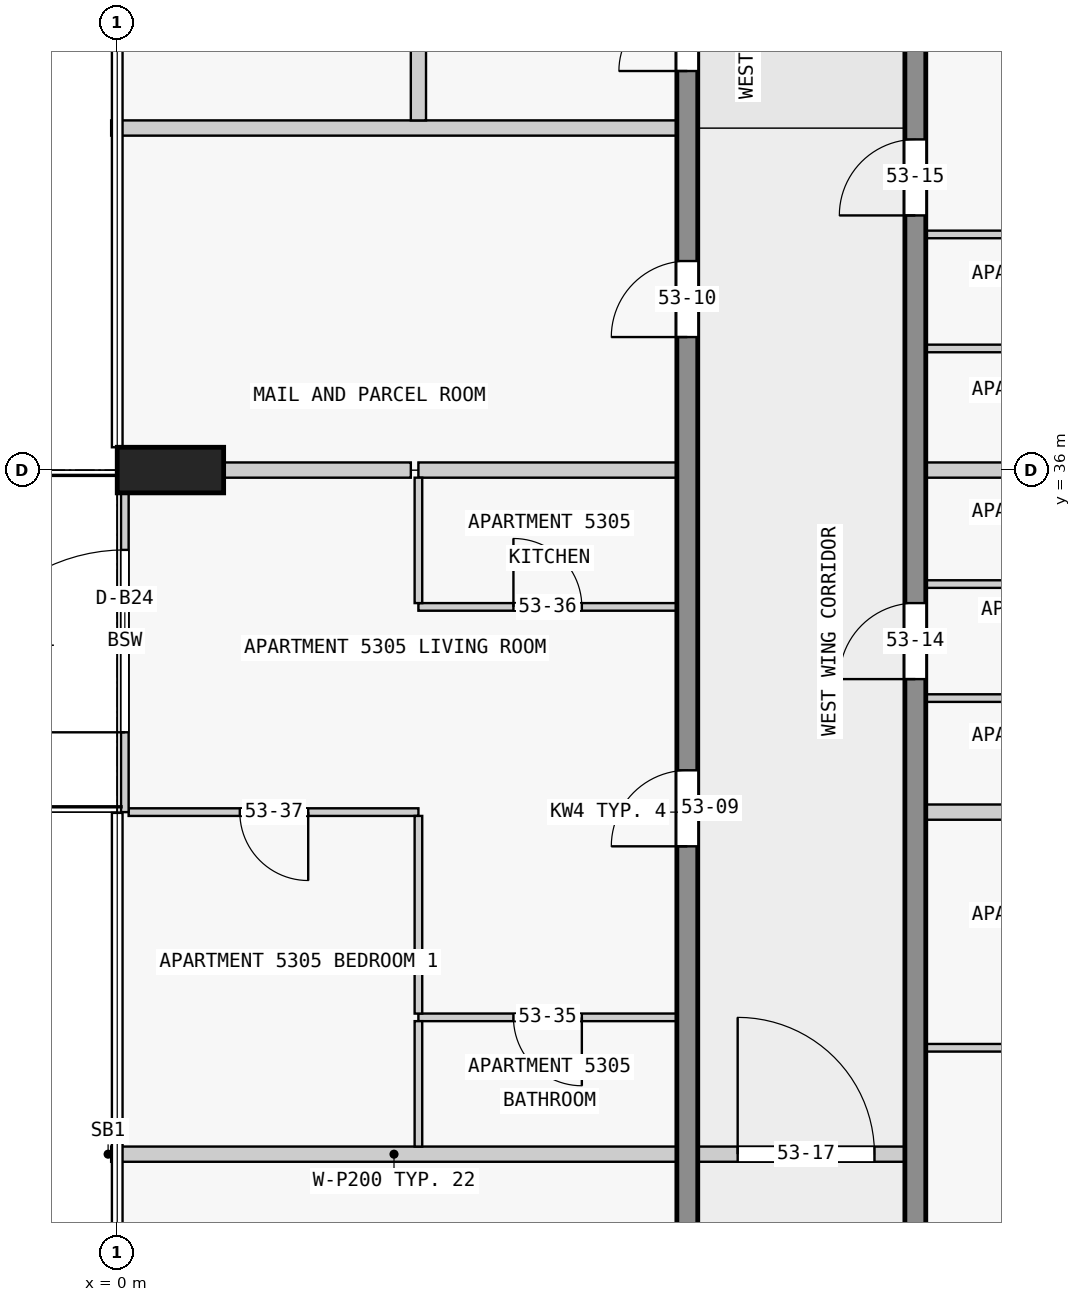
"""IFC4 building model, lengths in metres.
Left out: names, types, materials, properties, quantities, classifications, styles, units other than length and angle.
Written with IfcOpenShell. Run it as: python <this file> out.ifc"""

import sys

from ifc_helpers import new_model, si_unit, direction, frame, frame_2d, origin, origin_2d, place, context, subcontext, project, spatial, rectangle, extrude, element, fill, save


model = new_model("IFC4")
c1 = context("Model", 3, precision=1e-05, world=origin(), true_north=direction((0.0, 1.0)))
c2 = subcontext(c1, "Body", "Model", "MODEL_VIEW")
j1 = project(units=[si_unit("LENGTHUNIT", "METRE"), si_unit("PLANEANGLEUNIT", "RADIAN")], contexts=[c1])
p1 = place(None, origin())
s1 = spatial("IfcSite", under=j1, at=p1, CompositionType="ELEMENT")
p2 = place(p1, origin())
s2 = spatial("IfcBuilding", under=s1, at=p2, CompositionType="ELEMENT")
p3 = place(p2, frame((0.0, 0.0, 204.9)))
s3 = spatial("IfcBuildingStorey", under=s2, at=p3, CompositionType="ELEMENT", Elevation=204.9)
p4 = place(p3, frame((0.7, 36.0, 0.0), z_axis=(0.0, 0.0, 1.0), x_axis=(0.0, 1.0, 0.0)))
e1 = element("IfcColumn", 1, at=p4, inside=s3, PredefinedType="COLUMN", context=c2, shape_type="SweptSolid", body=[
    extrude(rectangle(XDim=0.6, YDim=1.4, at=origin_2d()), origin(), (0.0, 0.0, 1.0), 3.5),
])
p5 = place(p3, frame((7.5, 18.0, 0.0), z_axis=(0.0, 0.0, 1.0), x_axis=(0.0, 1.0, 0.0)))
e2 = element("IfcWall", 2, at=p5, inside=s3, PredefinedType="SHEAR", context=c2, shape_type="SweptSolid", body=[
    extrude(rectangle(XDim=27.0, YDim=0.275, at=frame_2d((13.5, 0.0))), origin(), (0.0, 0.0, 1.0), 3.25),
])
p6 = place(p5, frame((1.75, 0.0, 0.0)))
e3 = element("IfcOpeningElement", 3, at=p6, cuts=e2, PredefinedType="OPENING", context=c2, shape_type="SweptSolid", body=[
    extrude(rectangle(XDim=1.0, YDim=2.1, at=frame_2d((0.5, 1.05))), frame((0.0, 0.147, 0.0), z_axis=(0.0, -1.0, 0.0), x_axis=(1.0, 0.0, 0.0)), (0.0, 0.0, 1.0), 0.295),
])
p7 = place(p5, frame((5.85, 0.0, 0.0)))
e4 = element("IfcOpeningElement", 4, at=p7, cuts=e2, PredefinedType="OPENING", context=c2, shape_type="SweptSolid", body=[
    extrude(rectangle(XDim=1.8, YDim=2.1, at=frame_2d((0.9, 1.05))), frame((0.0, 0.147, 0.0), z_axis=(0.0, -1.0, 0.0), x_axis=(1.0, 0.0, 0.0)), (0.0, 0.0, 1.0), 0.295),
])
p8 = place(p5, frame((13.05, 0.0, 0.0)))
e5 = element("IfcOpeningElement", 5, at=p8, cuts=e2, PredefinedType="OPENING", context=c2, shape_type="SweptSolid", body=[
    extrude(rectangle(XDim=1.0, YDim=2.1, at=frame_2d((0.5, 1.05))), frame((0.0, 0.147, 0.0), z_axis=(0.0, -1.0, 0.0), x_axis=(1.0, 0.0, 0.0)), (0.0, 0.0, 1.0), 0.295),
])
p9 = place(p5, frame((19.75, 0.0, 0.0)))
e6 = element("IfcOpeningElement", 6, at=p9, cuts=e2, PredefinedType="OPENING", context=c2, shape_type="SweptSolid", body=[
    extrude(rectangle(XDim=1.0, YDim=2.1, at=frame_2d((0.5, 1.05))), frame((0.0, 0.147, 0.0), z_axis=(0.0, -1.0, 0.0), x_axis=(1.0, 0.0, 0.0)), (0.0, 0.0, 1.0), 0.295),
])
p10 = place(p5, frame((23.25, 0.0, 0.0)))
e7 = element("IfcOpeningElement", 7, at=p10, cuts=e2, PredefinedType="OPENING", context=c2, shape_type="SweptSolid", body=[
    extrude(rectangle(XDim=0.9, YDim=2.1, at=frame_2d((0.45, 1.05))), frame((0.0, 0.147, 0.0), z_axis=(0.0, -1.0, 0.0), x_axis=(1.0, 0.0, 0.0)), (0.0, 0.0, 1.0), 0.295),
])
p11 = place(p5, frame((25.45, 0.0, 0.0)))
e8 = element("IfcOpeningElement", 8, at=p11, cuts=e2, PredefinedType="OPENING", context=c2, shape_type="SweptSolid", body=[
    extrude(rectangle(XDim=1.0, YDim=2.1, at=frame_2d((0.5, 1.05))), frame((0.0, 0.147, 0.0), z_axis=(0.0, -1.0, 0.0), x_axis=(1.0, 0.0, 0.0)), (0.0, 0.0, 1.0), 0.295),
])
p12 = place(p3, frame((10.5, 18.0, 0.0), z_axis=(0.0, 0.0, 1.0), x_axis=(0.0, 1.0, 0.0)))
e9 = element("IfcWall", 9, at=p12, inside=s3, PredefinedType="SHEAR", context=c2, shape_type="SweptSolid", body=[
    extrude(rectangle(XDim=27.0, YDim=0.275, at=frame_2d((13.5, 0.0))), origin(), (0.0, 0.0, 1.0), 3.25),
])
p13 = place(p12, frame((4.85, 0.0, 0.0)))
e10 = element("IfcOpeningElement", 10, at=p13, cuts=e9, PredefinedType="OPENING", context=c2, shape_type="SweptSolid", body=[
    extrude(rectangle(XDim=1.0, YDim=2.1, at=frame_2d((0.5, 1.05))), frame((0.0, 0.147, 0.0), z_axis=(0.0, -1.0, 0.0), x_axis=(1.0, 0.0, 0.0)), (0.0, 0.0, 1.0), 0.295),
])
p14 = place(p12, frame((15.25, 0.0, 0.0)))
e11 = element("IfcOpeningElement", 11, at=p14, cuts=e9, PredefinedType="OPENING", context=c2, shape_type="SweptSolid", body=[
    extrude(rectangle(XDim=1.0, YDim=2.1, at=frame_2d((0.5, 1.05))), frame((0.0, 0.147, 0.0), z_axis=(0.0, -1.0, 0.0), x_axis=(1.0, 0.0, 0.0)), (0.0, 0.0, 1.0), 0.295),
])
p15 = place(p12, frame((21.35, 0.0, 0.0)))
e12 = element("IfcOpeningElement", 12, at=p15, cuts=e9, PredefinedType="OPENING", context=c2, shape_type="SweptSolid", body=[
    extrude(rectangle(XDim=1.0, YDim=2.1, at=frame_2d((0.5, 1.05))), frame((0.0, 0.147, 0.0), z_axis=(0.0, -1.0, 0.0), x_axis=(1.0, 0.0, 0.0)), (0.0, 0.0, 1.0), 0.295),
])
p16 = place(p3, frame((0.1, 31.5, 0.0), z_axis=(0.0, 0.0, 1.0), x_axis=(0.0, 1.0, 0.0)))
e13 = element("IfcWall", 13, at=p16, inside=s3, PredefinedType="STANDARD", context=c2, shape_type="SweptSolid", body=[
    extrude(rectangle(XDim=4.5, YDim=0.1, at=frame_2d((2.25, 0.0))), origin(), (0.0, 0.0, 1.0), 3.25),
])
p17 = place(p16, frame((1.05, 0.0, 0.0)))
e14 = element("IfcOpeningElement", 14, at=p17, cuts=e13, PredefinedType="OPENING", context=c2, shape_type="SweptSolid", body=[
    extrude(rectangle(XDim=2.4, YDim=2.4, at=frame_2d((1.2, 1.2))), frame((0.0, 0.06, 0.0), z_axis=(0.0, -1.0, 0.0), x_axis=(1.0, 0.0, 0.0)), (0.0, 0.0, 1.0), 0.12),
])
p18 = place(p3, frame((7.363, 27.0, 0.0), z_axis=(0.0, 0.0, 1.0), x_axis=(-1.0, 0.0, 0.0)))
e15 = element("IfcWall", 15, at=p18, inside=s3, PredefinedType="PARTITIONING", context=c2, shape_type="SweptSolid", body=[
    extrude(rectangle(XDim=7.443, YDim=0.2, at=frame_2d((3.721, 0.0))), origin(), (0.0, 0.0, 1.0), 3.25),
])
p19 = place(p3, frame((10.637, 28.4, 0.0), z_axis=(0.0, 0.0, 1.0), x_axis=(1.0, 0.0, 0.0)))
e16 = element("IfcWall", 16, at=p19, inside=s3, PredefinedType="PARTITIONING", context=c2, shape_type="SweptSolid", body=[
    extrude(rectangle(XDim=3.35, YDim=0.1, at=frame_2d((1.675, 0.0))), origin(), (0.0, 0.0, 1.0), 3.25),
])
p20 = place(p19, frame((1.25, 0.0, 0.0)))
e17 = element("IfcOpeningElement", 17, at=p20, cuts=e16, PredefinedType="OPENING", context=c2, shape_type="SweptSolid", body=[
    extrude(rectangle(XDim=0.9, YDim=2.1, at=frame_2d((0.45, 1.05))), frame((0.0, 0.06, 0.0), z_axis=(0.0, -1.0, 0.0), x_axis=(1.0, 0.0, 0.0)), (0.0, 0.0, 1.0), 0.12),
])
p21 = place(p3, frame((7.363, 28.8, 0.0), z_axis=(0.0, 0.0, 1.0), x_axis=(-1.0, 0.0, 0.0)))
e18 = element("IfcWall", 18, at=p21, inside=s3, PredefinedType="PARTITIONING", context=c2, shape_type="SweptSolid", body=[
    extrude(rectangle(XDim=3.4, YDim=0.1, at=frame_2d((1.7, 0.0))), origin(), (0.0, 0.0, 1.0), 3.25),
])
p22 = place(p21, frame((1.25, 0.0, 0.0)))
e19 = element("IfcOpeningElement", 19, at=p22, cuts=e18, PredefinedType="OPENING", context=c2, shape_type="SweptSolid", body=[
    extrude(rectangle(XDim=0.9, YDim=2.1, at=frame_2d((0.45, 1.05))), frame((0.0, 0.06, 0.0), z_axis=(0.0, -1.0, 0.0), x_axis=(1.0, 0.0, 0.0)), (0.0, 0.0, 1.0), 0.12),
])
p23 = place(p3, frame((3.962, 31.5, 0.0), z_axis=(0.0, 0.0, 1.0), x_axis=(-1.0, 0.0, 0.0)))
e20 = element("IfcWall", 20, at=p23, inside=s3, PredefinedType="PARTITIONING", context=c2, shape_type="SweptSolid", body=[
    extrude(rectangle(XDim=3.812, YDim=0.1, at=frame_2d((1.906, 0.0))), origin(), (0.0, 0.0, 1.0), 3.25),
])
p24 = place(p23, frame((1.45, 0.0, 0.0)))
e21 = element("IfcOpeningElement", 21, at=p24, cuts=e20, PredefinedType="OPENING", context=c2, shape_type="SweptSolid", body=[
    extrude(rectangle(XDim=0.9, YDim=2.1, at=frame_2d((0.45, 1.05))), frame((0.0, 0.06, 0.0), z_axis=(0.0, -1.0, 0.0), x_axis=(1.0, 0.0, 0.0)), (0.0, 0.0, 1.0), 0.12),
])
p25 = place(p3, frame((17.85, 31.5, 0.0), z_axis=(0.0, 0.0, 1.0), x_axis=(-1.0, 0.0, 0.0)))
e22 = element("IfcWall", 22, at=p25, inside=s3, PredefinedType="PARTITIONING", context=c2, shape_type="SweptSolid", body=[
    extrude(rectangle(XDim=7.213, YDim=0.2, at=frame_2d((3.606, 0.0))), origin(), (0.0, 0.0, 1.0), 3.25),
])
p26 = place(p3, frame((13.988, 33.0, 0.0), z_axis=(0.0, 0.0, 1.0), x_axis=(-1.0, 0.0, 0.0)))
e23 = element("IfcWall", 23, at=p26, inside=s3, PredefinedType="PARTITIONING", context=c2, shape_type="SweptSolid", body=[
    extrude(rectangle(XDim=3.35, YDim=0.1, at=frame_2d((1.675, 0.0))), origin(), (0.0, 0.0, 1.0), 3.25),
])
p27 = place(p26, frame((1.25, 0.0, 0.0)))
e24 = element("IfcOpeningElement", 24, at=p27, cuts=e23, PredefinedType="OPENING", context=c2, shape_type="SweptSolid", body=[
    extrude(rectangle(XDim=0.9, YDim=2.1, at=frame_2d((0.45, 1.05))), frame((0.0, 0.06, 0.0), z_axis=(0.0, -1.0, 0.0), x_axis=(1.0, 0.0, 0.0)), (0.0, 0.0, 1.0), 0.12),
])
p28 = place(p3, frame((3.962, 34.2, 0.0), z_axis=(0.0, 0.0, 1.0), x_axis=(1.0, 0.0, 0.0)))
e25 = element("IfcWall", 25, at=p28, inside=s3, PredefinedType="PARTITIONING", context=c2, shape_type="SweptSolid", body=[
    extrude(rectangle(XDim=3.4, YDim=0.1, at=frame_2d((1.7, 0.0))), origin(), (0.0, 0.0, 1.0), 3.25),
])
p29 = place(p28, frame((1.25, 0.0, 0.0)))
e26 = element("IfcOpeningElement", 26, at=p29, cuts=e25, PredefinedType="OPENING", context=c2, shape_type="SweptSolid", body=[
    extrude(rectangle(XDim=0.9, YDim=2.1, at=frame_2d((0.45, 1.05))), frame((0.0, 0.06, 0.0), z_axis=(0.0, -1.0, 0.0), x_axis=(1.0, 0.0, 0.0)), (0.0, 0.0, 1.0), 0.12),
])
p30 = place(p3, frame((10.637, 34.5, 0.0), z_axis=(0.0, 0.0, 1.0), x_axis=(1.0, 0.0, 0.0)))
e27 = element("IfcWall", 27, at=p30, inside=s3, PredefinedType="PARTITIONING", context=c2, shape_type="SweptSolid", body=[
    extrude(rectangle(XDim=3.35, YDim=0.1, at=frame_2d((1.675, 0.0))), origin(), (0.0, 0.0, 1.0), 3.25),
])
p31 = place(p30, frame((1.25, 0.0, 0.0)))
e28 = element("IfcOpeningElement", 28, at=p31, cuts=e27, PredefinedType="OPENING", context=c2, shape_type="SweptSolid", body=[
    extrude(rectangle(XDim=0.9, YDim=2.1, at=frame_2d((0.45, 1.05))), frame((0.0, 0.06, 0.0), z_axis=(0.0, -1.0, 0.0), x_axis=(1.0, 0.0, 0.0)), (0.0, 0.0, 1.0), 0.12),
])
for number, where, z_axis, x_axis in (
    (29, (7.363, 36.0, 0.0), (0.0, 0.0, 1.0), (-1.0, 0.0, 0.0)),
    (30, (14.038, 36.0, 0.0), (0.0, 0.0, 1.0), (-1.0, 0.0, 0.0)),
):
    element("IfcWall", number, at=place(p3, frame(where, z_axis=z_axis, x_axis=x_axis)), inside=s3, PredefinedType="PARTITIONING", context=c2, shape_type="SweptSolid", body=[
        extrude(rectangle(XDim=3.4, YDim=0.2, at=frame_2d((1.7, 0.0))), origin(), (0.0, 0.0, 1.0), 3.25),
    ])
p32 = place(p3, frame((1.4, 36.0, 0.0), z_axis=(0.0, 0.0, 1.0), x_axis=(1.0, 0.0, 0.0)))
e31 = element("IfcWall", 31, at=p32, inside=s3, PredefinedType="PARTITIONING", context=c2, shape_type="SweptSolid", body=[
    extrude(rectangle(XDim=2.463, YDim=0.2, at=frame_2d((1.231, 0.0))), origin(), (0.0, 0.0, 1.0), 3.25),
])
p33 = place(p3, frame((13.988, 37.6, 0.0), z_axis=(0.0, 0.0, 1.0), x_axis=(-1.0, 0.0, 0.0)))
e32 = element("IfcWall", 32, at=p33, inside=s3, PredefinedType="PARTITIONING", context=c2, shape_type="SweptSolid", body=[
    extrude(rectangle(XDim=3.35, YDim=0.1, at=frame_2d((1.675, 0.0))), origin(), (0.0, 0.0, 1.0), 3.25),
])
p34 = place(p3, frame((13.988, 39.1, 0.0), z_axis=(0.0, 0.0, 1.0), x_axis=(-1.0, 0.0, 0.0)))
e33 = element("IfcWall", 33, at=p34, inside=s3, PredefinedType="PARTITIONING", context=c2, shape_type="SweptSolid", body=[
    extrude(rectangle(XDim=3.35, YDim=0.1, at=frame_2d((1.675, 0.0))), origin(), (0.0, 0.0, 1.0), 3.25),
])
p35 = place(p34, frame((1.25, 0.0, 0.0)))
e34 = element("IfcOpeningElement", 34, at=p35, cuts=e33, PredefinedType="OPENING", context=c2, shape_type="SweptSolid", body=[
    extrude(rectangle(XDim=0.9, YDim=2.1, at=frame_2d((0.45, 1.05))), frame((0.0, 0.06, 0.0), z_axis=(0.0, -1.0, 0.0), x_axis=(1.0, 0.0, 0.0)), (0.0, 0.0, 1.0), 0.12),
])
p36 = place(p3, frame((7.363, 40.5, 0.0), z_axis=(0.0, 0.0, 1.0), x_axis=(-1.0, 0.0, 0.0)))
e35 = element("IfcWall", 35, at=p36, inside=s3, PredefinedType="PARTITIONING", context=c2, shape_type="SweptSolid", body=[
    extrude(rectangle(XDim=7.443, YDim=0.2, at=frame_2d((3.721, 0.0))), origin(), (0.0, 0.0, 1.0), 3.25),
])
for number, where, z_axis, x_axis in (
    (36, (3.962, 28.75, 0.0), (0.0, 0.0, 1.0), (0.0, -1.0, 0.0)),
    (37, (3.962, 35.9, 0.0), (0.0, 0.0, 1.0), (0.0, -1.0, 0.0)),
):
    element("IfcWall", number, at=place(p3, frame(where, z_axis=z_axis, x_axis=x_axis)), inside=s3, PredefinedType="PARTITIONING", context=c2, shape_type="SweptSolid", body=[
        extrude(rectangle(XDim=1.65, YDim=0.1, at=frame_2d((0.825, 0.0))), origin(), (0.0, 0.0, 1.0), 3.25),
    ])
p37 = place(p3, frame((3.962, 28.85, 0.0), z_axis=(0.0, 0.0, 1.0), x_axis=(0.0, 1.0, 0.0)))
e38 = element("IfcWall", 38, at=p37, inside=s3, PredefinedType="PARTITIONING", context=c2, shape_type="SweptSolid", body=[
    extrude(rectangle(XDim=2.6, YDim=0.1, at=frame_2d((1.3, 0.0))), origin(), (0.0, 0.0, 1.0), 3.25),
])
p38 = place(p3, frame((3.962, 42.8, 0.0), z_axis=(0.0, 0.0, 1.0), x_axis=(0.0, -1.0, 0.0)))
e39 = element("IfcWall", 39, at=p38, inside=s3, PredefinedType="PARTITIONING", context=c2, shape_type="SweptSolid", body=[
    extrude(rectangle(XDim=2.2, YDim=0.2, at=frame_2d((1.1, 0.0))), origin(), (0.0, 0.0, 1.0), 3.25),
])
p39 = place(p3, frame((7.462, 27.0, 0.0), z_axis=(0.0, 0.0, 1.0), x_axis=(1.0, 0.0, 0.0)))
e40 = element("IfcWall", 40, at=p39, inside=s3, PredefinedType="PARTITIONING", context=c2, shape_type="SweptSolid", body=[
    extrude(rectangle(XDim=3.175, YDim=0.2, at=frame_2d((1.587, 0.0))), origin(), (0.0, 0.0, 1.0), 3.25),
])
p40 = place(p39, frame((0.7, 0.0, 0.0)))
e41 = element("IfcOpeningElement", 41, at=p40, cuts=e40, PredefinedType="OPENING", context=c2, shape_type="SweptSolid", body=[
    extrude(rectangle(XDim=1.8, YDim=2.1, at=frame_2d((0.9, 1.05))), frame((0.0, 0.11, 0.0), z_axis=(0.0, -1.0, 0.0), x_axis=(1.0, 0.0, 0.0)), (0.0, 0.0, 1.0), 0.22),
])
p41 = place(p17, origin())
e42 = element("IfcDoor", 42, at=p41, inside=s3, OperationType="SINGLE_SWING_LEFT", PredefinedType="DOOR", context=c2, shape_type="SweptSolid", body=[
    extrude(rectangle(XDim=2.4, YDim=2.4, at=frame_2d((1.2, 1.2))), frame((0.0, 0.025, 0.0), z_axis=(0.0, -1.0, 0.0), x_axis=(1.0, 0.0, 0.0)), (0.0, 0.0, 1.0), 0.05),
])
fill(e14, e42)
p42 = place(p8, origin())
e43 = element("IfcDoor", 43, at=p42, inside=s3, OperationType="SINGLE_SWING_RIGHT", PredefinedType="DOOR", context=c2, shape_type="SweptSolid", body=[
    extrude(rectangle(XDim=1.0, YDim=2.1, at=frame_2d((0.5, 1.05))), frame((0.0, 0.025, 0.0), z_axis=(0.0, -1.0, 0.0), x_axis=(1.0, 0.0, 0.0)), (0.0, 0.0, 1.0), 0.05),
])
fill(e5, e43)
p43 = place(p9, origin())
e44 = element("IfcDoor", 44, at=p43, inside=s3, OperationType="SINGLE_SWING_RIGHT", PredefinedType="DOOR", context=c2, shape_type="SweptSolid", body=[
    extrude(rectangle(XDim=1.0, YDim=2.1, at=frame_2d((0.5, 1.05))), frame((0.0, 0.025, 0.0), z_axis=(0.0, -1.0, 0.0), x_axis=(1.0, 0.0, 0.0)), (0.0, 0.0, 1.0), 0.05),
])
fill(e6, e44)
p44 = place(p10, origin())
e45 = element("IfcDoor", 45, at=p44, inside=s3, OperationType="SINGLE_SWING_RIGHT", PredefinedType="DOOR", context=c2, shape_type="SweptSolid", body=[
    extrude(rectangle(XDim=0.9, YDim=2.1, at=frame_2d((0.45, 1.05))), frame((0.0, 0.025, 0.0), z_axis=(0.0, -1.0, 0.0), x_axis=(1.0, 0.0, 0.0)), (0.0, 0.0, 1.0), 0.05),
])
fill(e7, e45)
p45 = place(p14, origin())
e46 = element("IfcDoor", 46, at=p45, inside=s3, OperationType="SINGLE_SWING_RIGHT", PredefinedType="DOOR", context=c2, shape_type="SweptSolid", body=[
    extrude(rectangle(XDim=1.0, YDim=2.1, at=frame_2d((0.5, 1.05))), frame((0.0, 0.025, 0.0), z_axis=(0.0, -1.0, 0.0), x_axis=(1.0, 0.0, 0.0)), (0.0, 0.0, 1.0), 0.05),
])
fill(e11, e46)
p46 = place(p15, origin())
e47 = element("IfcDoor", 47, at=p46, inside=s3, OperationType="SINGLE_SWING_RIGHT", PredefinedType="DOOR", context=c2, shape_type="SweptSolid", body=[
    extrude(rectangle(XDim=1.0, YDim=2.1, at=frame_2d((0.5, 1.05))), frame((0.0, 0.025, 0.0), z_axis=(0.0, -1.0, 0.0), x_axis=(1.0, 0.0, 0.0)), (0.0, 0.0, 1.0), 0.05),
])
fill(e12, e47)
p47 = place(p40, origin())
e48 = element("IfcDoor", 48, at=p47, inside=s3, OperationType="SINGLE_SWING_RIGHT", PredefinedType="DOOR", context=c2, shape_type="SweptSolid", body=[
    extrude(rectangle(XDim=1.8, YDim=2.1, at=frame_2d((0.9, 1.05))), frame((0.0, 0.025, 0.0), z_axis=(0.0, -1.0, 0.0), x_axis=(1.0, 0.0, 0.0)), (0.0, 0.0, 1.0), 0.05),
])
fill(e41, e48)
p48 = place(p22, origin())
e49 = element("IfcDoor", 49, at=p48, inside=s3, OperationType="SINGLE_SWING_LEFT", PredefinedType="DOOR", context=c2, shape_type="SweptSolid", body=[
    extrude(rectangle(XDim=0.9, YDim=2.1, at=frame_2d((0.45, 1.05))), frame((0.0, 0.025, 0.0), z_axis=(0.0, -1.0, 0.0), x_axis=(1.0, 0.0, 0.0)), (0.0, 0.0, 1.0), 0.05),
])
fill(e19, e49)
p49 = place(p29, origin())
e50 = element("IfcDoor", 50, at=p49, inside=s3, OperationType="SINGLE_SWING_LEFT", PredefinedType="DOOR", context=c2, shape_type="SweptSolid", body=[
    extrude(rectangle(XDim=0.9, YDim=2.1, at=frame_2d((0.45, 1.05))), frame((0.0, 0.025, 0.0), z_axis=(0.0, -1.0, 0.0), x_axis=(1.0, 0.0, 0.0)), (0.0, 0.0, 1.0), 0.05),
])
fill(e26, e50)
p50 = place(p24, origin())
e51 = element("IfcDoor", 51, at=p50, inside=s3, OperationType="SINGLE_SWING_LEFT", PredefinedType="DOOR", context=c2, shape_type="SweptSolid", body=[
    extrude(rectangle(XDim=0.9, YDim=2.1, at=frame_2d((0.45, 1.05))), frame((0.0, 0.025, 0.0), z_axis=(0.0, -1.0, 0.0), x_axis=(1.0, 0.0, 0.0)), (0.0, 0.0, 1.0), 0.05),
])
fill(e21, e51)
save(model, sys.argv[1])
